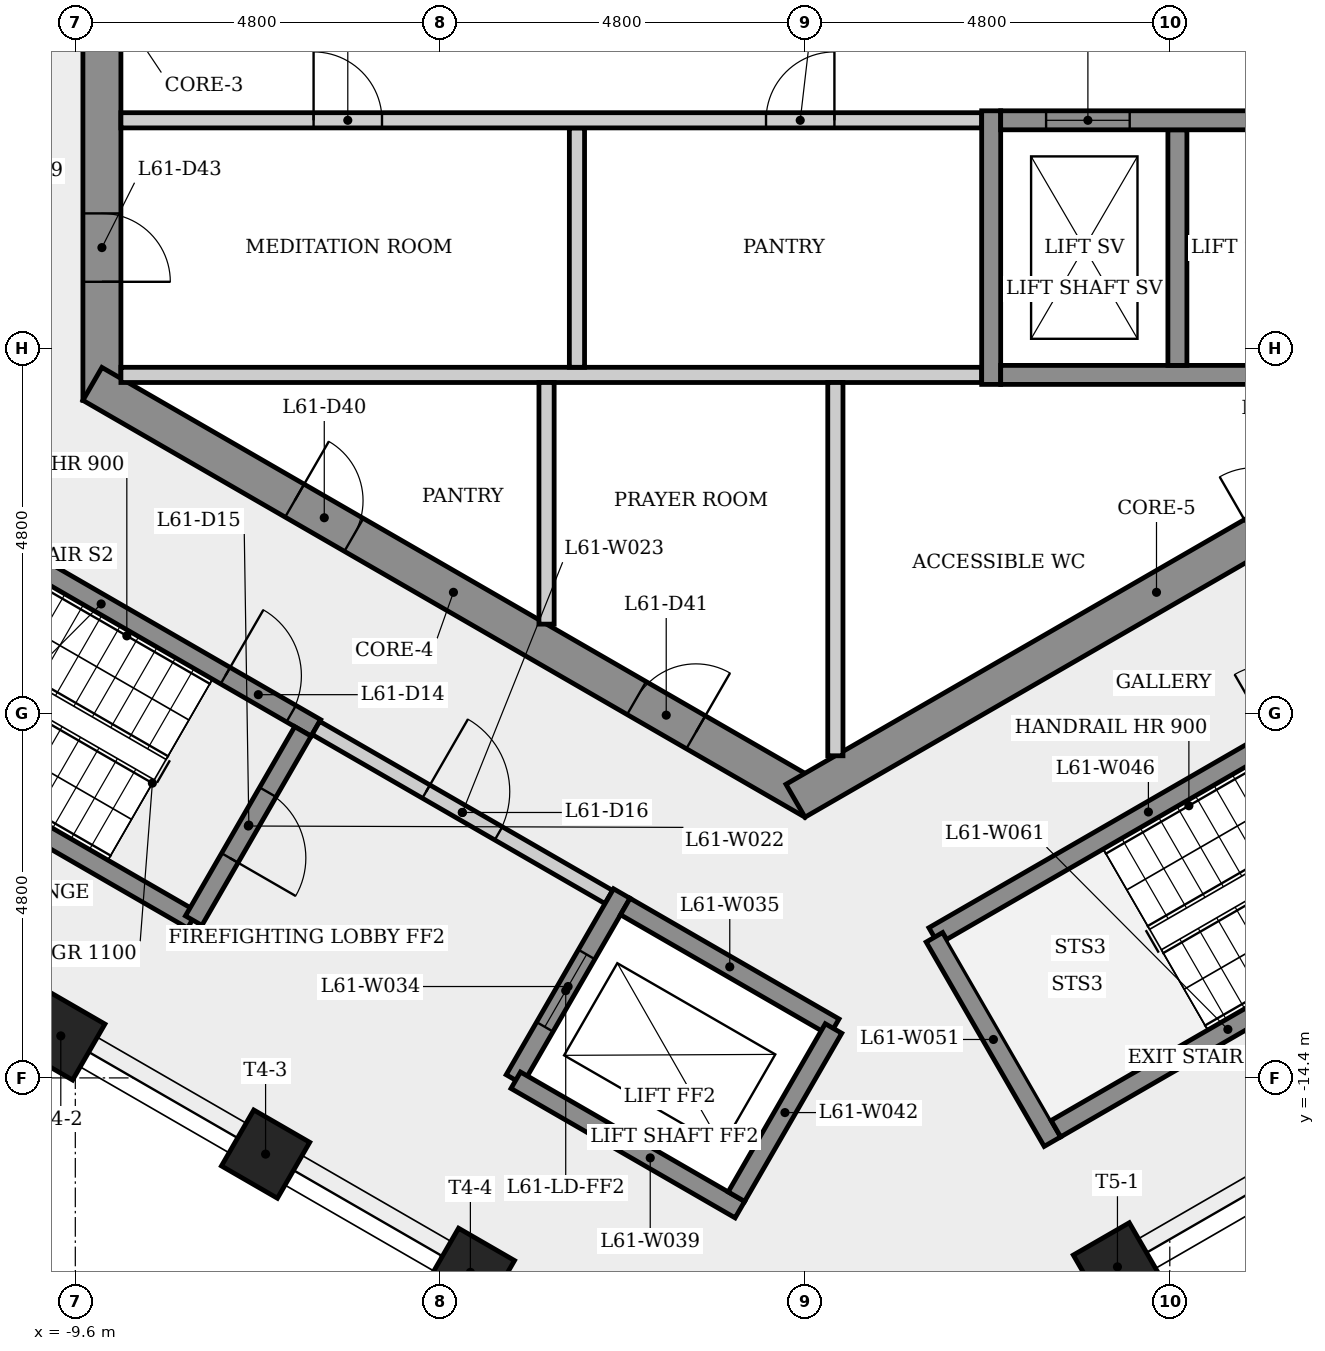
"""IFC4 building model, lengths in metres.
Left out: names, types, materials, properties, quantities, classifications, styles, units other than length and angle.
Written with IfcOpenShell. Run it as: python <this file> out.ifc"""

import sys

from ifc_helpers import new_model, si_unit, direction, frame, frame_2d, origin, origin_2d, place, context, subcontext, project, spatial, rectangle, extrude, element, fill, save


model = new_model("IFC4")
c1 = context("Model", 3, precision=1e-05, world=origin(), true_north=direction((0.0, 1.0)))
c2 = subcontext(c1, "Body", "Model", "MODEL_VIEW")
j1 = project(units=[si_unit("LENGTHUNIT", "METRE"), si_unit("PLANEANGLEUNIT", "RADIAN")], contexts=[c1])
p1 = place(None, origin())
s1 = spatial("IfcSite", under=j1, at=p1, CompositionType="ELEMENT")
p2 = place(p1, origin())
s2 = spatial("IfcBuilding", under=s1, at=p2, CompositionType="ELEMENT")
p3 = place(p2, frame((0.0, 0.0, 229.1)))
s3 = spatial("IfcBuildingStorey", under=s2, at=p3, CompositionType="ELEMENT", Elevation=229.1)
p4 = place(p3, frame((-9.25, 5.485, 0.0), z_axis=(0.0, 0.0, 1.0), x_axis=(0.0, -1.0, 0.0)))
e1 = element("IfcWall", 1, at=p4, inside=s3, PredefinedType="SHEAR", context=c2, shape_type="SweptSolid", body=[
    extrude(rectangle(XDim=10.97, YDim=0.5, at=frame_2d((5.485, 0.0))), origin(), (0.0, 0.0, 1.0), 3.4),
])
p5 = place(p4, frame((8.51, 0.0, 0.0)))
e2 = element("IfcOpeningElement", 2, at=p5, cuts=e1, PredefinedType="OPENING", context=c2, shape_type="SweptSolid", body=[
    extrude(rectangle(XDim=0.9, YDim=2.1, at=frame_2d((0.45, 1.05))), frame((0.0, 0.26, 0.0), z_axis=(0.0, -1.0, 0.0), x_axis=(1.0, 0.0, 0.0)), (0.0, 0.0, 1.0), 0.52),
])
p6 = place(p4, frame((4.685, 0.0, 0.0)))
e3 = element("IfcOpeningElement", 3, at=p6, cuts=e1, PredefinedType="OPENING", context=c2, shape_type="SweptSolid", body=[
    extrude(rectangle(XDim=1.6, YDim=2.1, at=frame_2d((0.8, 1.05))), frame((0.0, 0.26, 0.0), z_axis=(0.0, -1.0, 0.0), x_axis=(1.0, 0.0, 0.0)), (0.0, 0.0, 1.0), 0.52),
])
p7 = place(p3, frame((-9.375, -5.268, 0.0), z_axis=(0.0, 0.0, 1.0), x_axis=(0.866023993627, -0.500002442456, 0.0)))
e4 = element("IfcWall", 4, at=p7, inside=s3, PredefinedType="SHEAR", context=c2, shape_type="SweptSolid", body=[
    extrude(rectangle(XDim=10.97, YDim=0.5, at=frame_2d((5.485, 0.0))), origin(), (0.0, 0.0, 1.0), 3.4),
])
p8 = place(p7, frame((3.073, 0.0, 0.0)))
e5 = element("IfcOpeningElement", 5, at=p8, cuts=e4, PredefinedType="OPENING", context=c2, shape_type="SweptSolid", body=[
    extrude(rectangle(XDim=0.9, YDim=2.1, at=frame_2d((0.45, 1.05))), frame((0.0, 0.26, 0.0), z_axis=(0.0, -1.0, 0.0), x_axis=(1.0, 0.0, 0.0)), (0.0, 0.0, 1.0), 0.52),
])
p9 = place(p7, frame((8.267, 0.0, 0.0)))
e6 = element("IfcOpeningElement", 6, at=p9, cuts=e4, PredefinedType="OPENING", context=c2, shape_type="SweptSolid", body=[
    extrude(rectangle(XDim=0.9, YDim=2.1, at=frame_2d((0.45, 1.05))), frame((0.0, 0.26, 0.0), z_axis=(0.0, -1.0, 0.0), x_axis=(1.0, 0.0, 0.0)), (0.0, 0.0, 1.0), 0.52),
])
p10 = place(p3, frame((-0.125, -10.753, 0.0), z_axis=(0.0, 0.0, 1.0), x_axis=(0.866023993627, 0.500002442456, 0.0)))
e7 = element("IfcWall", 7, at=p10, inside=s3, PredefinedType="SHEAR", context=c2, shape_type="SweptSolid", body=[
    extrude(rectangle(XDim=10.97, YDim=0.5, at=frame_2d((5.485, 0.0))), origin(), (0.0, 0.0, 1.0), 3.4),
])
p11 = place(p10, frame((6.964, 0.0, 0.0)))
e8 = element("IfcOpeningElement", 8, at=p11, cuts=e7, PredefinedType="OPENING", context=c2, shape_type="SweptSolid", body=[
    extrude(rectangle(XDim=0.9, YDim=2.1, at=frame_2d((0.45, 1.05))), frame((0.0, 0.26, 0.0), z_axis=(0.0, -1.0, 0.0), x_axis=(1.0, 0.0, 0.0)), (0.0, 0.0, 1.0), 0.52),
])
for number, where, z_axis, x_axis in (
    (9, (-9.791, -13.847, 0.0), (0.0, 0.0, 1.0), (-0.5, -0.866, 0.0)),
    (10, (-7.096, -15.403, 0.0), (0.0, 0.0, 1.0), (-0.5, -0.866, 0.0)),
    (11, (-4.402, -16.958, 0.0), (0.0, 0.0, 1.0), (-0.5, -0.866, 0.0)),
    (12, (4.111, -16.886, 0.0), (0.0, 0.0, 1.0), (0.5, -0.866, 0.0)),
):
    element("IfcColumn", number, at=place(p3, frame(where, z_axis=z_axis, x_axis=x_axis)), inside=s3, PredefinedType="COLUMN", context=c2, shape_type="SweptSolid", body=[
        extrude(rectangle(XDim=0.85, YDim=0.85, at=origin_2d()), origin(), (0.0, 0.0, 1.0), 3.4),
    ])
p12 = place(p3, frame((-12.085, -6.532, 0.0), z_axis=(0.0, 0.0, 1.0), x_axis=(0.866031063448, -0.499990197047, 0.0)))
e13 = element("IfcWall", 13, at=p12, inside=s3, PredefinedType="SHEAR", context=c2, shape_type="SweptSolid", body=[
    extrude(rectangle(XDim=6.525, YDim=0.25, at=frame_2d((3.263, 0.0))), origin(), (0.0, 0.0, 1.0), 3.05),
])
p13 = place(p12, frame((5.15, 0.0, 0.0)))
e14 = element("IfcOpeningElement", 14, at=p13, cuts=e13, PredefinedType="OPENING", context=c2, shape_type="SweptSolid", body=[
    extrude(rectangle(XDim=1.0, YDim=2.1, at=frame_2d((0.5, 1.05))), frame((0.0, 0.135, 0.0), z_axis=(0.0, -1.0, 0.0), x_axis=(1.0, 0.0, 0.0)), (0.0, 0.0, 1.0), 0.27),
])
p14 = place(p3, frame((-9.0, -5.15, 0.0), z_axis=(0.0, 0.0, 1.0), x_axis=(1.0, 0.0, 0.0)))
e15 = element("IfcWall", 15, at=p14, inside=s3, PredefinedType="PARTITIONING", context=c2, shape_type="SweptSolid", body=[
    extrude(rectangle(XDim=11.325, YDim=0.2, at=frame_2d((5.663, 0.0))), origin(), (0.0, 0.0, 1.0), 3.05),
])
p15 = place(p3, frame((-8.06, -12.321, 0.0), z_axis=(0.0, 0.0, 1.0), x_axis=(-0.866029591389, 0.499992746786, 0.0)))
e16 = element("IfcWall", 16, at=p15, inside=s3, PredefinedType="SHEAR", context=c2, shape_type="SweptSolid", body=[
    extrude(rectangle(XDim=6.255, YDim=0.25, at=frame_2d((3.127, 0.0))), origin(), (0.0, 0.0, 1.0), 3.05),
])
p16 = place(p3, frame((-6.605, -9.841, 0.0), z_axis=(0.0, 0.0, 1.0), x_axis=(-0.500011588718, -0.866018712932, 0.0)))
e17 = element("IfcWall", 17, at=p16, inside=s3, PredefinedType="SHEAR", context=c2, shape_type="SweptSolid", body=[
    extrude(rectangle(XDim=2.875, YDim=0.25, at=frame_2d((1.438, 0.0))), origin(), (0.0, 0.0, 1.0), 3.05),
])
p17 = place(p16, frame((0.923, 0.0, 0.0)))
e18 = element("IfcOpeningElement", 18, at=p17, cuts=e17, PredefinedType="OPENING", context=c2, shape_type="SweptSolid", body=[
    extrude(rectangle(XDim=1.0, YDim=2.1, at=frame_2d((0.5, 1.05))), frame((0.0, 0.135, 0.0), z_axis=(0.0, -1.0, 0.0), x_axis=(1.0, 0.0, 0.0)), (0.0, 0.0, 1.0), 0.27),
])
p18 = place(p3, frame((-6.435, -9.795, 0.0), z_axis=(0.0, 0.0, 1.0), x_axis=(0.866012907634, -0.500021643343, 0.0)))
e19 = element("IfcWall", 19, at=p18, inside=s3, PredefinedType="PARTITIONING", context=c2, shape_type="SweptSolid", body=[
    extrude(rectangle(XDim=4.45, YDim=0.2, at=frame_2d((2.225, 0.0))), origin(), (0.0, 0.0, 1.0), 3.05),
])
p19 = place(p18, frame((1.675, 0.0, 0.0)))
e20 = element("IfcOpeningElement", 20, at=p19, cuts=e19, PredefinedType="OPENING", context=c2, shape_type="SweptSolid", body=[
    extrude(rectangle(XDim=1.1, YDim=2.1, at=frame_2d((0.55, 1.05))), frame((0.0, 0.11, 0.0), z_axis=(0.0, -1.0, 0.0), x_axis=(1.0, 0.0, 0.0)), (0.0, 0.0, 1.0), 0.22),
])
p20 = place(p3, frame((-3.4, -5.25, 0.0), z_axis=(0.0, 0.0, 1.0), x_axis=(0.0, -1.0, 0.0)))
e21 = element("IfcWall", 21, at=p20, inside=s3, PredefinedType="PARTITIONING", context=c2, shape_type="SweptSolid", body=[
    extrude(rectangle(XDim=3.179, YDim=0.2, at=frame_2d((1.59, 0.0))), origin(), (0.0, 0.0, 1.0), 3.05),
])
p21 = place(p3, frame((-3.0, -1.9, 0.0), z_axis=(0.0, 0.0, 1.0), x_axis=(0.0, -1.0, 0.0)))
e22 = element("IfcWall", 22, at=p21, inside=s3, PredefinedType="PARTITIONING", context=c2, shape_type="SweptSolid", body=[
    extrude(rectangle(XDim=3.15, YDim=0.2, at=frame_2d((1.575, 0.0))), origin(), (0.0, 0.0, 1.0), 3.05),
])
p22 = place(p3, frame((-9.0, -1.8, 0.0), z_axis=(0.0, 0.0, 1.0), x_axis=(1.0, 0.0, 0.0)))
e23 = element("IfcWall", 23, at=p22, inside=s3, PredefinedType="PARTITIONING", context=c2, shape_type="SweptSolid", body=[
    extrude(rectangle(XDim=11.325, YDim=0.2, at=frame_2d((5.663, 0.0))), origin(), (0.0, 0.0, 1.0), 3.05),
])
p23 = place(p22, frame((2.535, 0.0, 0.0)))
e24 = element("IfcOpeningElement", 24, at=p23, cuts=e23, PredefinedType="OPENING", context=c2, shape_type="SweptSolid", body=[
    extrude(rectangle(XDim=0.9, YDim=2.1, at=frame_2d((0.45, 1.05))), frame((0.0, 0.11, 0.0), z_axis=(0.0, -1.0, 0.0), x_axis=(1.0, 0.0, 0.0)), (0.0, 0.0, 1.0), 0.22),
])
p24 = place(p22, frame((8.488, 0.0, 0.0)))
e25 = element("IfcOpeningElement", 25, at=p24, cuts=e23, PredefinedType="OPENING", context=c2, shape_type="SweptSolid", body=[
    extrude(rectangle(XDim=0.9, YDim=2.1, at=frame_2d((0.45, 1.05))), frame((0.0, 0.11, 0.0), z_axis=(0.0, -1.0, 0.0), x_axis=(1.0, 0.0, 0.0)), (0.0, 0.0, 1.0), 0.22),
])
p25 = place(p3, frame((-2.41, -11.974, 0.0), z_axis=(0.0, 0.0, 1.0), x_axis=(-0.49998675294, -0.866033051843, 0.0)))
e26 = element("IfcWall", 26, at=p25, inside=s3, PredefinedType="SHEAR", context=c2, shape_type="SweptSolid", body=[
    extrude(rectangle(XDim=2.825, YDim=0.25, at=frame_2d((1.413, 0.0))), origin(), (0.0, 0.0, 1.0), 3.05),
])
p26 = place(p25, frame((0.926, 0.0, 0.0)))
e27 = element("IfcOpeningElement", 27, at=p26, cuts=e26, PredefinedType="OPENING", context=c2, shape_type="SweptSolid", body=[
    extrude(rectangle(XDim=1.1, YDim=2.1, at=frame_2d((0.55, 1.05))), frame((0.0, 0.135, 0.0), z_axis=(0.0, -1.0, 0.0), x_axis=(1.0, 0.0, 0.0)), (0.0, 0.0, 1.0), 0.27),
])
p27 = place(p3, frame((-2.364, -12.145, 0.0), z_axis=(0.0, 0.0, 1.0), x_axis=(0.866048579423, -0.499959856469, 0.0)))
e28 = element("IfcWall", 28, at=p27, inside=s3, PredefinedType="SHEAR", context=c2, shape_type="SweptSolid", body=[
    extrude(rectangle(XDim=3.175, YDim=0.25, at=frame_2d((1.587, 0.0))), origin(), (0.0, 0.0, 1.0), 3.4),
])
p28 = place(p3, frame((-0.856, -16.133, 0.0), z_axis=(0.0, 0.0, 1.0), x_axis=(-0.866032748241, 0.499987278812, 0.0)))
e29 = element("IfcWall", 29, at=p28, inside=s3, PredefinedType="SHEAR", context=c2, shape_type="SweptSolid", body=[
    extrude(rectangle(XDim=3.405, YDim=0.25, at=frame_2d((1.702, 0.0))), origin(), (0.0, 0.0, 1.0), 3.05),
])
p29 = place(p3, frame((0.375, -13.75, 0.0), z_axis=(0.0, 0.0, 1.0), x_axis=(-0.50003400563, -0.866005769735, 0.0)))
e30 = element("IfcWall", 30, at=p29, inside=s3, PredefinedType="SHEAR", context=c2, shape_type="SweptSolid", body=[
    extrude(rectangle(XDim=2.555, YDim=0.25, at=frame_2d((1.277, 0.0))), origin(), (0.0, 0.0, 1.0), 3.4),
])
p30 = place(p3, frame((0.4, -5.25, 0.0), z_axis=(0.0, 0.0, 1.0), x_axis=(0.0, -1.0, 0.0)))
e31 = element("IfcWall", 31, at=p30, inside=s3, PredefinedType="PARTITIONING", context=c2, shape_type="SweptSolid", body=[
    extrude(rectangle(XDim=4.911, YDim=0.2, at=frame_2d((2.456, 0.0))), origin(), (0.0, 0.0, 1.0), 3.05),
])
p31 = place(p3, frame((1.693, -12.532, 0.0), z_axis=(0.0, 0.0, 1.0), x_axis=(0.866031063448, 0.499990197047, 0.0)))
e32 = element("IfcWall", 32, at=p31, inside=s3, PredefinedType="SHEAR", context=c2, shape_type="SweptSolid", body=[
    extrude(rectangle(XDim=6.525, YDim=0.25, at=frame_2d((3.263, 0.0))), origin(), (0.0, 0.0, 1.0), 3.05),
])
p32 = place(p31, frame((5.15, 0.0, 0.0)))
e33 = element("IfcOpeningElement", 33, at=p32, cuts=e32, PredefinedType="OPENING", context=c2, shape_type="SweptSolid", body=[
    extrude(rectangle(XDim=1.0, YDim=2.1, at=frame_2d((0.5, 1.05))), frame((0.0, 0.135, 0.0), z_axis=(0.0, -1.0, 0.0), x_axis=(1.0, 0.0, 0.0)), (0.0, 0.0, 1.0), 0.27),
])
p33 = place(p3, frame((2.45, -5.275, 0.0), z_axis=(0.0, 0.0, 1.0), x_axis=(0.0, 1.0, 0.0)))
e34 = element("IfcWall", 34, at=p33, inside=s3, PredefinedType="SHEAR", context=c2, shape_type="SweptSolid", body=[
    extrude(rectangle(XDim=3.6, YDim=0.25, at=frame_2d((1.8, 0.0))), origin(), (0.0, 0.0, 1.0), 3.05),
])
p34 = place(p3, frame((3.256, -15.239, 0.0), z_axis=(0.0, 0.0, 1.0), x_axis=(-0.500003782172, 0.866023220135, 0.0)))
e35 = element("IfcWall", 35, at=p34, inside=s3, PredefinedType="SHEAR", context=c2, shape_type="SweptSolid", body=[
    extrude(rectangle(XDim=3.105, YDim=0.25, at=frame_2d((1.552, 0.0))), origin(), (0.0, 0.0, 1.0), 3.05),
])
p35 = place(p3, frame((2.575, -5.15, 0.0), z_axis=(0.0, 0.0, 1.0), x_axis=(1.0, 0.0, 0.0)))
e36 = element("IfcWall", 36, at=p35, inside=s3, PredefinedType="SHEAR", context=c2, shape_type="SweptSolid", body=[
    extrude(rectangle(XDim=4.9, YDim=0.25, at=frame_2d((2.45, 0.0))), origin(), (0.0, 0.0, 1.0), 3.05),
])
p36 = place(p3, frame((4.9, -1.925, 0.0), z_axis=(0.0, 0.0, 1.0), x_axis=(0.0, -1.0, 0.0)))
e37 = element("IfcWall", 37, at=p36, inside=s3, PredefinedType="SHEAR", context=c2, shape_type="SweptSolid", body=[
    extrude(rectangle(XDim=3.1, YDim=0.25, at=frame_2d((1.55, 0.0))), origin(), (0.0, 0.0, 1.0), 3.4),
])
p37 = place(p3, frame((2.575, -1.8, 0.0), z_axis=(0.0, 0.0, 1.0), x_axis=(1.0, 0.0, 0.0)))
e38 = element("IfcWall", 38, at=p37, inside=s3, PredefinedType="SHEAR", context=c2, shape_type="SweptSolid", body=[
    extrude(rectangle(XDim=4.9, YDim=0.25, at=frame_2d((2.45, 0.0))), origin(), (0.0, 0.0, 1.0), 3.05),
])
p38 = place(p37, frame((0.597, 0.0, 0.0)))
e39 = element("IfcOpeningElement", 39, at=p38, cuts=e38, PredefinedType="OPENING", context=c2, shape_type="SweptSolid", body=[
    extrude(rectangle(XDim=1.1, YDim=2.1, at=frame_2d((0.55, 1.05))), frame((0.0, 0.135, 0.0), z_axis=(0.0, -1.0, 0.0), x_axis=(1.0, 0.0, 0.0)), (0.0, 0.0, 1.0), 0.27),
])
p39 = place(p3, frame((7.073, -12.891, 0.0), z_axis=(0.0, 0.0, 1.0), x_axis=(-0.866023145199, -0.500003911965, 0.0)))
e40 = element("IfcWall", 40, at=p39, inside=s3, PredefinedType="SHEAR", context=c2, shape_type="SweptSolid", body=[
    extrude(rectangle(XDim=4.355, YDim=0.25, at=frame_2d((2.177, 0.0))), origin(), (0.0, 0.0, 1.0), 3.05),
])
p40 = place(p38, origin())
e41 = element("IfcDoor", 41, at=p40, inside=s3, OperationType="SLIDING_TO_LEFT", PredefinedType="DOOR", context=c2, shape_type="SweptSolid", body=[
    extrude(rectangle(XDim=1.1, YDim=2.1, at=frame_2d((0.55, 1.05))), frame((0.0, 0.025, 0.0), z_axis=(0.0, -1.0, 0.0), x_axis=(1.0, 0.0, 0.0)), (0.0, 0.0, 1.0), 0.05),
])
fill(e39, e41)
p41 = place(p23, origin())
e42 = element("IfcDoor", 42, at=p41, inside=s3, OperationType="SINGLE_SWING_LEFT", PredefinedType="DOOR", context=c2, shape_type="SweptSolid", body=[
    extrude(rectangle(XDim=0.9, YDim=2.1, at=frame_2d((0.45, 1.05))), frame((0.0, 0.025, 0.0), z_axis=(0.0, -1.0, 0.0), x_axis=(1.0, 0.0, 0.0)), (0.0, 0.0, 1.0), 0.05),
])
fill(e24, e42)
p42 = place(p24, origin())
e43 = element("IfcDoor", 43, at=p42, inside=s3, OperationType="SINGLE_SWING_RIGHT", PredefinedType="DOOR", context=c2, shape_type="SweptSolid", body=[
    extrude(rectangle(XDim=0.9, YDim=2.1, at=frame_2d((0.45, 1.05))), frame((0.0, 0.025, 0.0), z_axis=(0.0, -1.0, 0.0), x_axis=(1.0, 0.0, 0.0)), (0.0, 0.0, 1.0), 0.05),
])
fill(e25, e43)
p43 = place(p13, origin())
e44 = element("IfcDoor", 44, at=p43, inside=s3, OperationType="SINGLE_SWING_LEFT", PredefinedType="DOOR", context=c2, shape_type="SweptSolid", body=[
    extrude(rectangle(XDim=1.0, YDim=2.1, at=frame_2d((0.5, 1.05))), frame((0.0, 0.025, 0.0), z_axis=(0.0, -1.0, 0.0), x_axis=(1.0, 0.0, 0.0)), (0.0, 0.0, 1.0), 0.05),
])
fill(e14, e44)
p44 = place(p17, origin())
e45 = element("IfcDoor", 45, at=p44, inside=s3, OperationType="SINGLE_SWING_RIGHT", PredefinedType="DOOR", context=c2, shape_type="SweptSolid", body=[
    extrude(rectangle(XDim=1.0, YDim=2.1, at=frame_2d((0.5, 1.05))), frame((0.0, 0.025, 0.0), z_axis=(0.0, -1.0, 0.0), x_axis=(1.0, 0.0, 0.0)), (0.0, 0.0, 1.0), 0.05),
])
fill(e18, e45)
p45 = place(p19, origin())
e46 = element("IfcDoor", 46, at=p45, inside=s3, OperationType="SINGLE_SWING_LEFT", PredefinedType="DOOR", context=c2, shape_type="SweptSolid", body=[
    extrude(rectangle(XDim=1.1, YDim=2.1, at=frame_2d((0.55, 1.05))), frame((0.0, 0.025, 0.0), z_axis=(0.0, -1.0, 0.0), x_axis=(1.0, 0.0, 0.0)), (0.0, 0.0, 1.0), 0.05),
])
fill(e20, e46)
p46 = place(p26, origin())
e47 = element("IfcDoor", 47, at=p46, inside=s3, OperationType="SLIDING_TO_LEFT", PredefinedType="DOOR", context=c2, shape_type="SweptSolid", body=[
    extrude(rectangle(XDim=1.1, YDim=2.1, at=frame_2d((0.55, 1.05))), frame((0.0, 0.025, 0.0), z_axis=(0.0, -1.0, 0.0), x_axis=(1.0, 0.0, 0.0)), (0.0, 0.0, 1.0), 0.05),
])
fill(e27, e47)
p47 = place(p8, origin())
e48 = element("IfcDoor", 48, at=p47, inside=s3, OperationType="SINGLE_SWING_LEFT", PredefinedType="DOOR", context=c2, shape_type="SweptSolid", body=[
    extrude(rectangle(XDim=0.9, YDim=2.1, at=frame_2d((0.45, 1.05))), frame((0.0, 0.025, 0.0), z_axis=(0.0, -1.0, 0.0), x_axis=(1.0, 0.0, 0.0)), (0.0, 0.0, 1.0), 0.05),
])
fill(e5, e48)
p48 = place(p9, origin())
e49 = element("IfcDoor", 49, at=p48, inside=s3, OperationType="SINGLE_SWING_RIGHT", PredefinedType="DOOR", context=c2, shape_type="SweptSolid", body=[
    extrude(rectangle(XDim=0.9, YDim=2.1, at=frame_2d((0.45, 1.05))), frame((0.0, 0.025, 0.0), z_axis=(0.0, -1.0, 0.0), x_axis=(1.0, 0.0, 0.0)), (0.0, 0.0, 1.0), 0.05),
])
fill(e6, e49)
p49 = place(p5, origin())
e50 = element("IfcDoor", 50, at=p49, inside=s3, OperationType="SINGLE_SWING_RIGHT", PredefinedType="DOOR", context=c2, shape_type="SweptSolid", body=[
    extrude(rectangle(XDim=0.9, YDim=2.1, at=frame_2d((0.45, 1.05))), frame((0.0, 0.025, 0.0), z_axis=(0.0, -1.0, 0.0), x_axis=(1.0, 0.0, 0.0)), (0.0, 0.0, 1.0), 0.05),
])
fill(e2, e50)
save(model, sys.argv[1])
